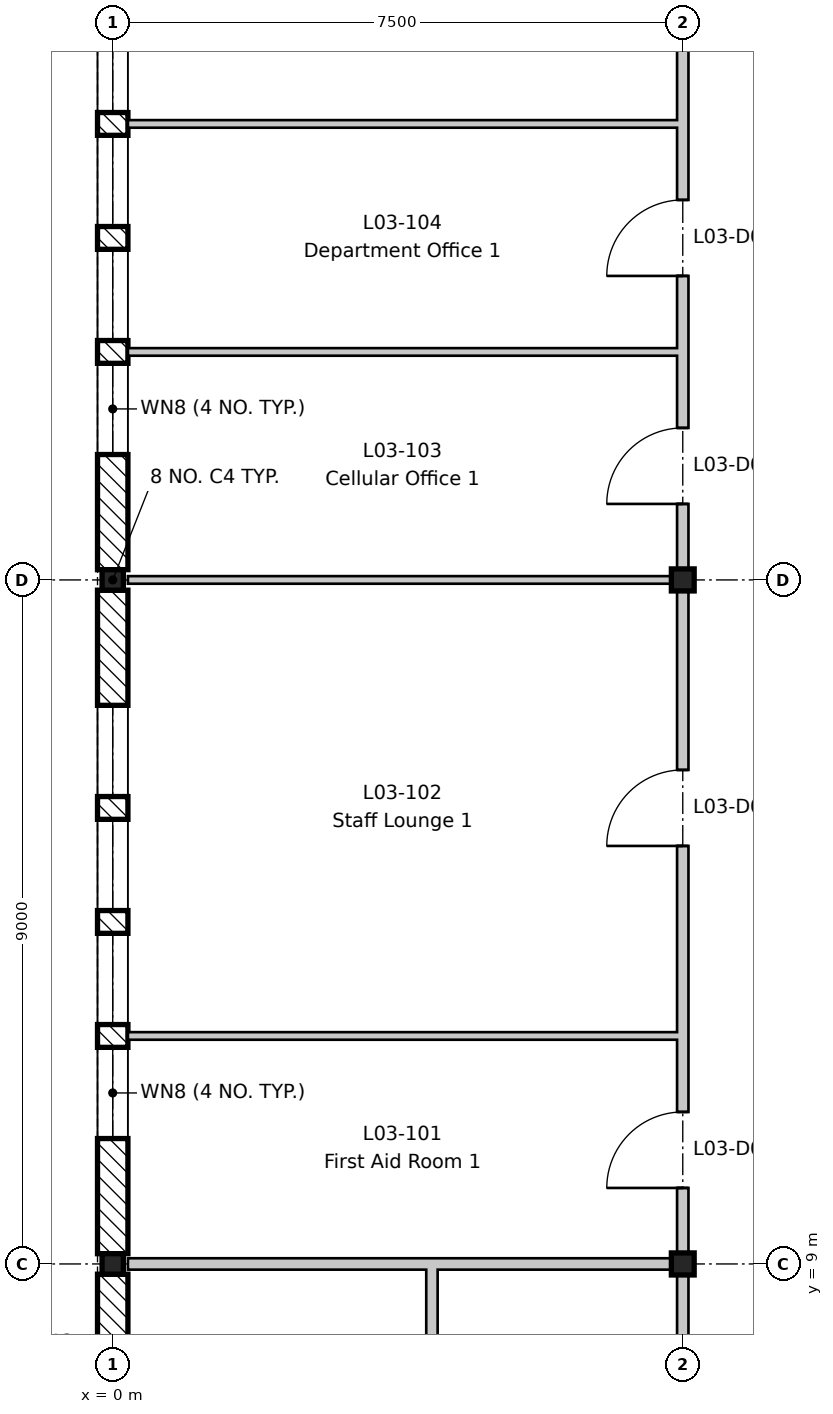
"""IFC4 building model, lengths in metres.
Left out: names, types, materials, properties, quantities, classifications, styles, units other than length and angle.
Written with IfcOpenShell. Run it as: python <this file> out.ifc"""

import sys

from ifc_helpers import new_model, si_unit, direction, frame, frame_2d, origin, origin_2d, place, context, subcontext, project, spatial, rectangle, i_section, extrude, element, fill, save


model = new_model("IFC4")
c1 = context("Model", 3, precision=1e-05, world=origin(), true_north=direction((0.0, 1.0)))
c2 = subcontext(c1, "Body", "Model", "MODEL_VIEW")
j1 = project(units=[si_unit("LENGTHUNIT", "METRE"), si_unit("PLANEANGLEUNIT", "RADIAN")], contexts=[c1])
p1 = place(None, origin())
s1 = spatial("IfcSite", under=j1, at=p1, CompositionType="ELEMENT")
p2 = place(p1, origin())
s2 = spatial("IfcBuilding", under=s1, at=p2, CompositionType="ELEMENT")
p3 = place(p2, frame((0.0, 0.0, 14.4)))
s3 = spatial("IfcBuildingStorey", under=s2, at=p3, CompositionType="ELEMENT", Elevation=14.4)
for number, where, z_axis, x_axis in (
    (1, (0.0, 9.0, -0.2), (0.0, 0.0, 1.0), (1.0, 0.0, 0.0)),
    (2, (0.0, 18.0, -0.2), (0.0, 0.0, 1.0), (1.0, 0.0, 0.0)),
):
    element("IfcColumn", number, at=place(p3, frame(where, z_axis=z_axis, x_axis=x_axis)), inside=s3, PredefinedType="COLUMN", context=c2, shape_type="SweptSolid", body=[
        extrude(i_section(OverallWidth=0.28, OverallDepth=0.27, WebThickness=0.008, FlangeThickness=0.013, FilletRadius=0.024, at=origin_2d()), origin(), (0.0, 0.0, 1.0), 4.2),
    ])
for number, where, z_axis, x_axis in (
    (3, (7.5, 9.0, -0.2), (0.0, 0.0, 1.0), (1.0, 0.0, 0.0)),
    (4, (7.5, 18.0, -0.2), (0.0, 0.0, 1.0), (1.0, 0.0, 0.0)),
):
    element("IfcColumn", number, at=place(p3, frame(where, z_axis=z_axis, x_axis=x_axis)), inside=s3, PredefinedType="COLUMN", context=c2, shape_type="SweptSolid", body=[
        extrude(i_section(OverallWidth=0.3, OverallDepth=0.29, WebThickness=0.009, FlangeThickness=0.014, FilletRadius=0.027, at=origin_2d()), origin(), (0.0, 0.0, 1.0), 4.2),
    ])
p4 = place(p3, frame((0.0, 0.135, 0.0), z_axis=(0.0, 0.0, 1.0), x_axis=(0.0, 1.0, 0.0)))
e5 = element("IfcWall", 5, at=p4, inside=s3, PredefinedType="STANDARD", context=c2, shape_type="SweptSolid", body=[
    extrude(rectangle(XDim=8.73, YDim=0.4, at=frame_2d((4.365, 0.0))), origin(), (0.0, 0.0, 1.0), 3.6),
])
p5 = place(p4, frame((1.815, 0.0, 1.5)))
e6 = element("IfcOpeningElement", 6, at=p5, cuts=e5, PredefinedType="OPENING", context=c2, shape_type="SweptSolid", body=[
    extrude(rectangle(XDim=0.6, YDim=1.2, at=frame_2d((0.3, 0.6))), frame((0.0, 0.21, 0.0), z_axis=(0.0, -1.0, 0.0), x_axis=(1.0, 0.0, 0.0)), (0.0, 0.0, 1.0), 0.42),
])
p6 = place(p4, frame((3.315, 0.0, 1.5)))
e7 = element("IfcOpeningElement", 7, at=p6, cuts=e5, PredefinedType="OPENING", context=c2, shape_type="SweptSolid", body=[
    extrude(rectangle(XDim=0.6, YDim=1.2, at=frame_2d((0.3, 0.6))), frame((0.0, 0.21, 0.0), z_axis=(0.0, -1.0, 0.0), x_axis=(1.0, 0.0, 0.0)), (0.0, 0.0, 1.0), 0.42),
])
p7 = place(p4, frame((4.815, 0.0, 1.5)))
e8 = element("IfcOpeningElement", 8, at=p7, cuts=e5, PredefinedType="OPENING", context=c2, shape_type="SweptSolid", body=[
    extrude(rectangle(XDim=0.6, YDim=1.2, at=frame_2d((0.3, 0.6))), frame((0.0, 0.21, 0.0), z_axis=(0.0, -1.0, 0.0), x_axis=(1.0, 0.0, 0.0)), (0.0, 0.0, 1.0), 0.42),
])
p8 = place(p4, frame((6.315, 0.0, 1.5)))
e9 = element("IfcOpeningElement", 9, at=p8, cuts=e5, PredefinedType="OPENING", context=c2, shape_type="SweptSolid", body=[
    extrude(rectangle(XDim=0.6, YDim=1.2, at=frame_2d((0.3, 0.6))), frame((0.0, 0.21, 0.0), z_axis=(0.0, -1.0, 0.0), x_axis=(1.0, 0.0, 0.0)), (0.0, 0.0, 1.0), 0.42),
])
p9 = place(p3, frame((0.0, 9.135, 0.0), z_axis=(0.0, 0.0, 1.0), x_axis=(0.0, 1.0, 0.0)))
e10 = element("IfcWall", 10, at=p9, inside=s3, PredefinedType="STANDARD", context=c2, shape_type="SweptSolid", body=[
    extrude(rectangle(XDim=8.73, YDim=0.4, at=frame_2d((4.365, 0.0))), origin(), (0.0, 0.0, 1.0), 3.6),
])
p10 = place(p9, frame((1.515, 0.0, 0.6)))
e11 = element("IfcOpeningElement", 11, at=p10, cuts=e10, PredefinedType="OPENING", context=c2, shape_type="SweptSolid", body=[
    extrude(rectangle(XDim=1.2, YDim=2.7, at=frame_2d((0.6, 1.35))), frame((0.0, 0.21, 0.0), z_axis=(0.0, -1.0, 0.0), x_axis=(1.0, 0.0, 0.0)), (0.0, 0.0, 1.0), 0.42),
])
p11 = place(p9, frame((3.015, 0.0, 0.6)))
e12 = element("IfcOpeningElement", 12, at=p11, cuts=e10, PredefinedType="OPENING", context=c2, shape_type="SweptSolid", body=[
    extrude(rectangle(XDim=1.2, YDim=2.7, at=frame_2d((0.6, 1.35))), frame((0.0, 0.21, 0.0), z_axis=(0.0, -1.0, 0.0), x_axis=(1.0, 0.0, 0.0)), (0.0, 0.0, 1.0), 0.42),
])
p12 = place(p9, frame((4.515, 0.0, 0.6)))
e13 = element("IfcOpeningElement", 13, at=p12, cuts=e10, PredefinedType="OPENING", context=c2, shape_type="SweptSolid", body=[
    extrude(rectangle(XDim=1.2, YDim=2.7, at=frame_2d((0.6, 1.35))), frame((0.0, 0.21, 0.0), z_axis=(0.0, -1.0, 0.0), x_axis=(1.0, 0.0, 0.0)), (0.0, 0.0, 1.0), 0.42),
])
p13 = place(p9, frame((6.015, 0.0, 0.6)))
e14 = element("IfcOpeningElement", 14, at=p13, cuts=e10, PredefinedType="OPENING", context=c2, shape_type="SweptSolid", body=[
    extrude(rectangle(XDim=1.2, YDim=2.7, at=frame_2d((0.6, 1.35))), frame((0.0, 0.21, 0.0), z_axis=(0.0, -1.0, 0.0), x_axis=(1.0, 0.0, 0.0)), (0.0, 0.0, 1.0), 0.42),
])
p14 = place(p3, frame((0.0, 18.135, 0.0), z_axis=(0.0, 0.0, 1.0), x_axis=(0.0, 1.0, 0.0)))
e15 = element("IfcWall", 15, at=p14, inside=s3, PredefinedType="STANDARD", context=c2, shape_type="SweptSolid", body=[
    extrude(rectangle(XDim=8.73, YDim=0.4, at=frame_2d((4.365, 0.0))), origin(), (0.0, 0.0, 1.0), 3.6),
])
p15 = place(p14, frame((1.515, 0.0, 0.6)))
e16 = element("IfcOpeningElement", 16, at=p15, cuts=e15, PredefinedType="OPENING", context=c2, shape_type="SweptSolid", body=[
    extrude(rectangle(XDim=1.2, YDim=2.7, at=frame_2d((0.6, 1.35))), frame((0.0, 0.21, 0.0), z_axis=(0.0, -1.0, 0.0), x_axis=(1.0, 0.0, 0.0)), (0.0, 0.0, 1.0), 0.42),
])
p16 = place(p14, frame((3.015, 0.0, 0.6)))
e17 = element("IfcOpeningElement", 17, at=p16, cuts=e15, PredefinedType="OPENING", context=c2, shape_type="SweptSolid", body=[
    extrude(rectangle(XDim=1.2, YDim=2.7, at=frame_2d((0.6, 1.35))), frame((0.0, 0.21, 0.0), z_axis=(0.0, -1.0, 0.0), x_axis=(1.0, 0.0, 0.0)), (0.0, 0.0, 1.0), 0.42),
])
p17 = place(p14, frame((4.515, 0.0, 0.6)))
e18 = element("IfcOpeningElement", 18, at=p17, cuts=e15, PredefinedType="OPENING", context=c2, shape_type="SweptSolid", body=[
    extrude(rectangle(XDim=1.2, YDim=2.7, at=frame_2d((0.6, 1.35))), frame((0.0, 0.21, 0.0), z_axis=(0.0, -1.0, 0.0), x_axis=(1.0, 0.0, 0.0)), (0.0, 0.0, 1.0), 0.42),
])
p18 = place(p14, frame((6.015, 0.0, 0.6)))
e19 = element("IfcOpeningElement", 19, at=p18, cuts=e15, PredefinedType="OPENING", context=c2, shape_type="SweptSolid", body=[
    extrude(rectangle(XDim=1.2, YDim=2.7, at=frame_2d((0.6, 1.35))), frame((0.0, 0.21, 0.0), z_axis=(0.0, -1.0, 0.0), x_axis=(1.0, 0.0, 0.0)), (0.0, 0.0, 1.0), 0.42),
])
p19 = place(p3, frame((0.2, 9.0, 0.0), z_axis=(0.0, 0.0, 1.0), x_axis=(1.0, 0.0, 0.0)))
e20 = element("IfcWall", 20, at=p19, inside=s3, PredefinedType="PARTITIONING", context=c2, shape_type="SweptSolid", body=[
    extrude(rectangle(XDim=7.225, YDim=0.15, at=frame_2d((3.613, 0.0))), origin(), (0.0, 0.0, 1.0), 3.65),
])
p20 = place(p3, frame((0.2, 12.0, 0.0), z_axis=(0.0, 0.0, 1.0), x_axis=(1.0, 0.0, 0.0)))
e21 = element("IfcWall", 21, at=p20, inside=s3, PredefinedType="PARTITIONING", context=c2, shape_type="SweptSolid", body=[
    extrude(rectangle(XDim=7.225, YDim=0.1, at=frame_2d((3.613, 0.0))), origin(), (0.0, 0.0, 1.0), 4.0),
])
p21 = place(p3, frame((0.2, 18.0, 0.0), z_axis=(0.0, 0.0, 1.0), x_axis=(1.0, 0.0, 0.0)))
e22 = element("IfcWall", 22, at=p21, inside=s3, PredefinedType="PARTITIONING", context=c2, shape_type="SweptSolid", body=[
    extrude(rectangle(XDim=7.225, YDim=0.1, at=frame_2d((3.613, 0.0))), origin(), (0.0, 0.0, 1.0), 3.65),
])
for number, where, z_axis, x_axis in (
    (23, (0.2, 21.0, 0.0), (0.0, 0.0, 1.0), (1.0, 0.0, 0.0)),
    (24, (0.2, 24.0, 0.0), (0.0, 0.0, 1.0), (1.0, 0.0, 0.0)),
):
    element("IfcWall", number, at=place(p3, frame(where, z_axis=z_axis, x_axis=x_axis)), inside=s3, PredefinedType="PARTITIONING", context=c2, shape_type="SweptSolid", body=[
        extrude(rectangle(XDim=7.225, YDim=0.1, at=frame_2d((3.613, 0.0))), origin(), (0.0, 0.0, 1.0), 4.0),
    ])
p22 = place(p3, frame((7.5, -8.8, 0.0), z_axis=(0.0, 0.0, 1.0), x_axis=(0.0, 1.0, 0.0)))
e25 = element("IfcWall", 25, at=p22, inside=s3, PredefinedType="PARTITIONING", context=c2, shape_type="SweptSolid", body=[
    extrude(rectangle(XDim=79.3, YDim=0.15, at=frame_2d((39.65, 0.0))), origin(), (0.0, 0.0, 1.0), 3.48),
])
p23 = place(p22, frame((18.8, 0.0, 0.0)))
e26 = element("IfcOpeningElement", 26, at=p23, cuts=e25, PredefinedType="OPENING", context=c2, shape_type="SweptSolid", body=[
    extrude(rectangle(XDim=1.0, YDim=2.1, at=frame_2d((0.5, 1.05))), frame((0.0, 0.085, 0.0), z_axis=(0.0, -1.0, 0.0), x_axis=(1.0, 0.0, 0.0)), (0.0, 0.0, 1.0), 0.17),
])
p24 = place(p22, frame((23.3, 0.0, 0.0)))
e27 = element("IfcOpeningElement", 27, at=p24, cuts=e25, PredefinedType="OPENING", context=c2, shape_type="SweptSolid", body=[
    extrude(rectangle(XDim=1.0, YDim=2.1, at=frame_2d((0.5, 1.05))), frame((0.0, 0.085, 0.0), z_axis=(0.0, -1.0, 0.0), x_axis=(1.0, 0.0, 0.0)), (0.0, 0.0, 1.0), 0.17),
])
p25 = place(p22, frame((27.8, 0.0, 0.0)))
e28 = element("IfcOpeningElement", 28, at=p25, cuts=e25, PredefinedType="OPENING", context=c2, shape_type="SweptSolid", body=[
    extrude(rectangle(XDim=1.0, YDim=2.1, at=frame_2d((0.5, 1.05))), frame((0.0, 0.085, 0.0), z_axis=(0.0, -1.0, 0.0), x_axis=(1.0, 0.0, 0.0)), (0.0, 0.0, 1.0), 0.17),
])
p26 = place(p22, frame((30.8, 0.0, 0.0)))
e29 = element("IfcOpeningElement", 29, at=p26, cuts=e25, PredefinedType="OPENING", context=c2, shape_type="SweptSolid", body=[
    extrude(rectangle(XDim=1.0, YDim=2.1, at=frame_2d((0.5, 1.05))), frame((0.0, 0.085, 0.0), z_axis=(0.0, -1.0, 0.0), x_axis=(1.0, 0.0, 0.0)), (0.0, 0.0, 1.0), 0.17),
])
p27 = place(p22, frame((33.8, 0.0, 0.0)))
e30 = element("IfcOpeningElement", 30, at=p27, cuts=e25, PredefinedType="OPENING", context=c2, shape_type="SweptSolid", body=[
    extrude(rectangle(XDim=1.0, YDim=2.1, at=frame_2d((0.5, 1.05))), frame((0.0, 0.085, 0.0), z_axis=(0.0, -1.0, 0.0), x_axis=(1.0, 0.0, 0.0)), (0.0, 0.0, 1.0), 0.17),
])
p28 = place(p22, frame((47.3, 0.0, 0.0)))
e31 = element("IfcOpeningElement", 31, at=p28, cuts=e25, PredefinedType="OPENING", context=c2, shape_type="SweptSolid", body=[
    extrude(rectangle(XDim=1.0, YDim=2.1, at=frame_2d((0.5, 1.05))), frame((0.0, 0.085, 0.0), z_axis=(0.0, -1.0, 0.0), x_axis=(1.0, 0.0, 0.0)), (0.0, 0.0, 1.0), 0.17),
])
p29 = place(p22, frame((51.8, 0.0, 0.0)))
e32 = element("IfcOpeningElement", 32, at=p29, cuts=e25, PredefinedType="OPENING", context=c2, shape_type="SweptSolid", body=[
    extrude(rectangle(XDim=1.0, YDim=2.1, at=frame_2d((0.5, 1.05))), frame((0.0, 0.085, 0.0), z_axis=(0.0, -1.0, 0.0), x_axis=(1.0, 0.0, 0.0)), (0.0, 0.0, 1.0), 0.17),
])
p30 = place(p22, frame((54.8, 0.0, 0.0)))
e33 = element("IfcOpeningElement", 33, at=p30, cuts=e25, PredefinedType="OPENING", context=c2, shape_type="SweptSolid", body=[
    extrude(rectangle(XDim=1.0, YDim=2.1, at=frame_2d((0.5, 1.05))), frame((0.0, 0.085, 0.0), z_axis=(0.0, -1.0, 0.0), x_axis=(1.0, 0.0, 0.0)), (0.0, 0.0, 1.0), 0.17),
])
p31 = place(p22, frame((57.8, 0.0, 0.0)))
e34 = element("IfcOpeningElement", 34, at=p31, cuts=e25, PredefinedType="OPENING", context=c2, shape_type="SweptSolid", body=[
    extrude(rectangle(XDim=1.0, YDim=2.1, at=frame_2d((0.5, 1.05))), frame((0.0, 0.085, 0.0), z_axis=(0.0, -1.0, 0.0), x_axis=(1.0, 0.0, 0.0)), (0.0, 0.0, 1.0), 0.17),
])
p32 = place(p22, frame((60.8, 0.0, 0.0)))
e35 = element("IfcOpeningElement", 35, at=p32, cuts=e25, PredefinedType="OPENING", context=c2, shape_type="SweptSolid", body=[
    extrude(rectangle(XDim=1.0, YDim=2.1, at=frame_2d((0.5, 1.05))), frame((0.0, 0.085, 0.0), z_axis=(0.0, -1.0, 0.0), x_axis=(1.0, 0.0, 0.0)), (0.0, 0.0, 1.0), 0.17),
])
p33 = place(p22, frame((12.6, 0.0, 0.0)))
e36 = element("IfcOpeningElement", 36, at=p33, cuts=e25, PredefinedType="OPENING", context=c2, shape_type="SweptSolid", body=[
    extrude(rectangle(XDim=1.4, YDim=2.1, at=frame_2d((0.7, 1.05))), frame((0.0, 0.085, 0.0), z_axis=(0.0, -1.0, 0.0), x_axis=(1.0, 0.0, 0.0)), (0.0, 0.0, 1.0), 0.17),
])
p34 = place(p22, frame((3.6, 0.0, 0.0)))
e37 = element("IfcOpeningElement", 37, at=p34, cuts=e25, PredefinedType="OPENING", context=c2, shape_type="SweptSolid", body=[
    extrude(rectangle(XDim=1.4, YDim=2.1, at=frame_2d((0.7, 1.05))), frame((0.0, 0.085, 0.0), z_axis=(0.0, -1.0, 0.0), x_axis=(1.0, 0.0, 0.0)), (0.0, 0.0, 1.0), 0.17),
])
p35 = place(p22, frame((63.55, 0.0, 0.0)))
e38 = element("IfcOpeningElement", 38, at=p35, cuts=e25, PredefinedType="OPENING", context=c2, shape_type="SweptSolid", body=[
    extrude(rectangle(XDim=1.4, YDim=2.1, at=frame_2d((0.7, 1.05))), frame((0.0, 0.085, 0.0), z_axis=(0.0, -1.0, 0.0), x_axis=(1.0, 0.0, 0.0)), (0.0, 0.0, 1.0), 0.17),
])
p36 = place(p22, frame((69.6, 0.0, 0.0)))
e39 = element("IfcOpeningElement", 39, at=p36, cuts=e25, PredefinedType="OPENING", context=c2, shape_type="SweptSolid", body=[
    extrude(rectangle(XDim=1.4, YDim=2.1, at=frame_2d((0.7, 1.05))), frame((0.0, 0.085, 0.0), z_axis=(0.0, -1.0, 0.0), x_axis=(1.0, 0.0, 0.0)), (0.0, 0.0, 1.0), 0.17),
])
p37 = place(p22, frame((42.85, 0.0, 0.0)))
e40 = element("IfcOpeningElement", 40, at=p37, cuts=e25, PredefinedType="OPENING", context=c2, shape_type="SweptSolid", body=[
    extrude(rectangle(XDim=1.0, YDim=2.1, at=frame_2d((0.5, 1.05))), frame((0.0, 0.085, 0.0), z_axis=(0.0, -1.0, 0.0), x_axis=(1.0, 0.0, 0.0)), (0.0, 0.0, 1.0), 0.17),
])
p38 = place(p22, frame((36.55, 0.0, 0.0)))
e41 = element("IfcOpeningElement", 41, at=p38, cuts=e25, PredefinedType="OPENING", context=c2, shape_type="SweptSolid", body=[
    extrude(rectangle(XDim=1.4, YDim=2.1, at=frame_2d((0.7, 1.05))), frame((0.0, 0.085, 0.0), z_axis=(0.0, -1.0, 0.0), x_axis=(1.0, 0.0, 0.0)), (0.0, 0.0, 1.0), 0.17),
])
p39 = place(p22, frame((72.8, 0.0, 0.0)))
e42 = element("IfcOpeningElement", 42, at=p39, cuts=e25, PredefinedType="OPENING", context=c2, shape_type="SweptSolid", body=[
    extrude(rectangle(XDim=1.0, YDim=2.1, at=frame_2d((0.5, 1.05))), frame((0.0, 0.085, 0.0), z_axis=(0.0, -1.0, 0.0), x_axis=(1.0, 0.0, 0.0)), (0.0, 0.0, 1.0), 0.17),
])
p40 = place(p3, frame((4.2, 0.075, 0.0), z_axis=(0.0, 0.0, 1.0), x_axis=(0.0, 1.0, 0.0)))
e43 = element("IfcWall", 43, at=p40, inside=s3, PredefinedType="PARTITIONING", context=c2, shape_type="SweptSolid", body=[
    extrude(rectangle(XDim=8.85, YDim=0.15, at=frame_2d((4.425, 0.0))), origin(), (0.0, 0.0, 1.0), 4.0),
])
p41 = place(p40, frame((0.975, 0.0, 0.0)))
e44 = element("IfcOpeningElement", 44, at=p41, cuts=e43, PredefinedType="OPENING", context=c2, shape_type="SweptSolid", body=[
    extrude(rectangle(XDim=0.9, YDim=2.1, at=frame_2d((0.45, 1.05))), frame((0.0, 0.085, 0.0), z_axis=(0.0, -1.0, 0.0), x_axis=(1.0, 0.0, 0.0)), (0.0, 0.0, 1.0), 0.17),
])
p42 = place(p40, frame((3.975, 0.0, 0.0)))
e45 = element("IfcOpeningElement", 45, at=p42, cuts=e43, PredefinedType="OPENING", context=c2, shape_type="SweptSolid", body=[
    extrude(rectangle(XDim=0.9, YDim=2.1, at=frame_2d((0.45, 1.05))), frame((0.0, 0.085, 0.0), z_axis=(0.0, -1.0, 0.0), x_axis=(1.0, 0.0, 0.0)), (0.0, 0.0, 1.0), 0.17),
])
p43 = place(p40, frame((6.925, 0.0, 0.0)))
e46 = element("IfcOpeningElement", 46, at=p43, cuts=e43, PredefinedType="OPENING", context=c2, shape_type="SweptSolid", body=[
    extrude(rectangle(XDim=1.0, YDim=2.1, at=frame_2d((0.5, 1.05))), frame((0.0, 0.085, 0.0), z_axis=(0.0, -1.0, 0.0), x_axis=(1.0, 0.0, 0.0)), (0.0, 0.0, 1.0), 0.17),
])
p44 = place(p10, origin())
e47 = element("IfcWindow", 47, at=p44, inside=s3, PartitioningType="SINGLE_PANEL", PredefinedType="WINDOW", context=c2, shape_type="SweptSolid", body=[
    extrude(rectangle(XDim=1.2, YDim=2.7, at=frame_2d((0.6, 1.35))), frame((0.0, 0.03, 0.0), z_axis=(0.0, -1.0, 0.0), x_axis=(1.0, 0.0, 0.0)), (0.0, 0.0, 1.0), 0.06),
])
fill(e11, e47)
p45 = place(p11, origin())
e48 = element("IfcWindow", 48, at=p45, inside=s3, PartitioningType="SINGLE_PANEL", PredefinedType="WINDOW", context=c2, shape_type="SweptSolid", body=[
    extrude(rectangle(XDim=1.2, YDim=2.7, at=frame_2d((0.6, 1.35))), frame((0.0, 0.03, 0.0), z_axis=(0.0, -1.0, 0.0), x_axis=(1.0, 0.0, 0.0)), (0.0, 0.0, 1.0), 0.06),
])
fill(e12, e48)
p46 = place(p12, origin())
e49 = element("IfcWindow", 49, at=p46, inside=s3, PartitioningType="SINGLE_PANEL", PredefinedType="WINDOW", context=c2, shape_type="SweptSolid", body=[
    extrude(rectangle(XDim=1.2, YDim=2.7, at=frame_2d((0.6, 1.35))), frame((0.0, 0.03, 0.0), z_axis=(0.0, -1.0, 0.0), x_axis=(1.0, 0.0, 0.0)), (0.0, 0.0, 1.0), 0.06),
])
fill(e13, e49)
p47 = place(p13, origin())
e50 = element("IfcWindow", 50, at=p47, inside=s3, PartitioningType="SINGLE_PANEL", PredefinedType="WINDOW", context=c2, shape_type="SweptSolid", body=[
    extrude(rectangle(XDim=1.2, YDim=2.7, at=frame_2d((0.6, 1.35))), frame((0.0, 0.03, 0.0), z_axis=(0.0, -1.0, 0.0), x_axis=(1.0, 0.0, 0.0)), (0.0, 0.0, 1.0), 0.06),
])
fill(e14, e50)
p48 = place(p15, origin())
e51 = element("IfcWindow", 51, at=p48, inside=s3, PartitioningType="SINGLE_PANEL", PredefinedType="WINDOW", context=c2, shape_type="SweptSolid", body=[
    extrude(rectangle(XDim=1.2, YDim=2.7, at=frame_2d((0.6, 1.35))), frame((0.0, 0.03, 0.0), z_axis=(0.0, -1.0, 0.0), x_axis=(1.0, 0.0, 0.0)), (0.0, 0.0, 1.0), 0.06),
])
fill(e16, e51)
p49 = place(p16, origin())
e52 = element("IfcWindow", 52, at=p49, inside=s3, PartitioningType="SINGLE_PANEL", PredefinedType="WINDOW", context=c2, shape_type="SweptSolid", body=[
    extrude(rectangle(XDim=1.2, YDim=2.7, at=frame_2d((0.6, 1.35))), frame((0.0, 0.03, 0.0), z_axis=(0.0, -1.0, 0.0), x_axis=(1.0, 0.0, 0.0)), (0.0, 0.0, 1.0), 0.06),
])
fill(e17, e52)
p50 = place(p17, origin())
e53 = element("IfcWindow", 53, at=p50, inside=s3, PartitioningType="SINGLE_PANEL", PredefinedType="WINDOW", context=c2, shape_type="SweptSolid", body=[
    extrude(rectangle(XDim=1.2, YDim=2.7, at=frame_2d((0.6, 1.35))), frame((0.0, 0.03, 0.0), z_axis=(0.0, -1.0, 0.0), x_axis=(1.0, 0.0, 0.0)), (0.0, 0.0, 1.0), 0.06),
])
fill(e18, e53)
p51 = place(p18, origin())
e54 = element("IfcWindow", 54, at=p51, inside=s3, PartitioningType="SINGLE_PANEL", PredefinedType="WINDOW", context=c2, shape_type="SweptSolid", body=[
    extrude(rectangle(XDim=1.2, YDim=2.7, at=frame_2d((0.6, 1.35))), frame((0.0, 0.03, 0.0), z_axis=(0.0, -1.0, 0.0), x_axis=(1.0, 0.0, 0.0)), (0.0, 0.0, 1.0), 0.06),
])
fill(e19, e54)
p52 = place(p23, origin())
e55 = element("IfcDoor", 55, at=p52, inside=s3, OperationType="SINGLE_SWING_LEFT", PredefinedType="DOOR", context=c2, shape_type="SweptSolid", body=[
    extrude(rectangle(XDim=1.0, YDim=2.1, at=frame_2d((0.5, 1.05))), frame((0.0, 0.025, 0.0), z_axis=(0.0, -1.0, 0.0), x_axis=(1.0, 0.0, 0.0)), (0.0, 0.0, 1.0), 0.05),
])
fill(e26, e55)
p53 = place(p24, origin())
e56 = element("IfcDoor", 56, at=p53, inside=s3, OperationType="SINGLE_SWING_LEFT", PredefinedType="DOOR", context=c2, shape_type="SweptSolid", body=[
    extrude(rectangle(XDim=1.0, YDim=2.1, at=frame_2d((0.5, 1.05))), frame((0.0, 0.025, 0.0), z_axis=(0.0, -1.0, 0.0), x_axis=(1.0, 0.0, 0.0)), (0.0, 0.0, 1.0), 0.05),
])
fill(e27, e56)
p54 = place(p25, origin())
e57 = element("IfcDoor", 57, at=p54, inside=s3, OperationType="SINGLE_SWING_LEFT", PredefinedType="DOOR", context=c2, shape_type="SweptSolid", body=[
    extrude(rectangle(XDim=1.0, YDim=2.1, at=frame_2d((0.5, 1.05))), frame((0.0, 0.025, 0.0), z_axis=(0.0, -1.0, 0.0), x_axis=(1.0, 0.0, 0.0)), (0.0, 0.0, 1.0), 0.05),
])
fill(e28, e57)
p55 = place(p26, origin())
e58 = element("IfcDoor", 58, at=p55, inside=s3, OperationType="SINGLE_SWING_LEFT", PredefinedType="DOOR", context=c2, shape_type="SweptSolid", body=[
    extrude(rectangle(XDim=1.0, YDim=2.1, at=frame_2d((0.5, 1.05))), frame((0.0, 0.025, 0.0), z_axis=(0.0, -1.0, 0.0), x_axis=(1.0, 0.0, 0.0)), (0.0, 0.0, 1.0), 0.05),
])
fill(e29, e58)
save(model, sys.argv[1])
